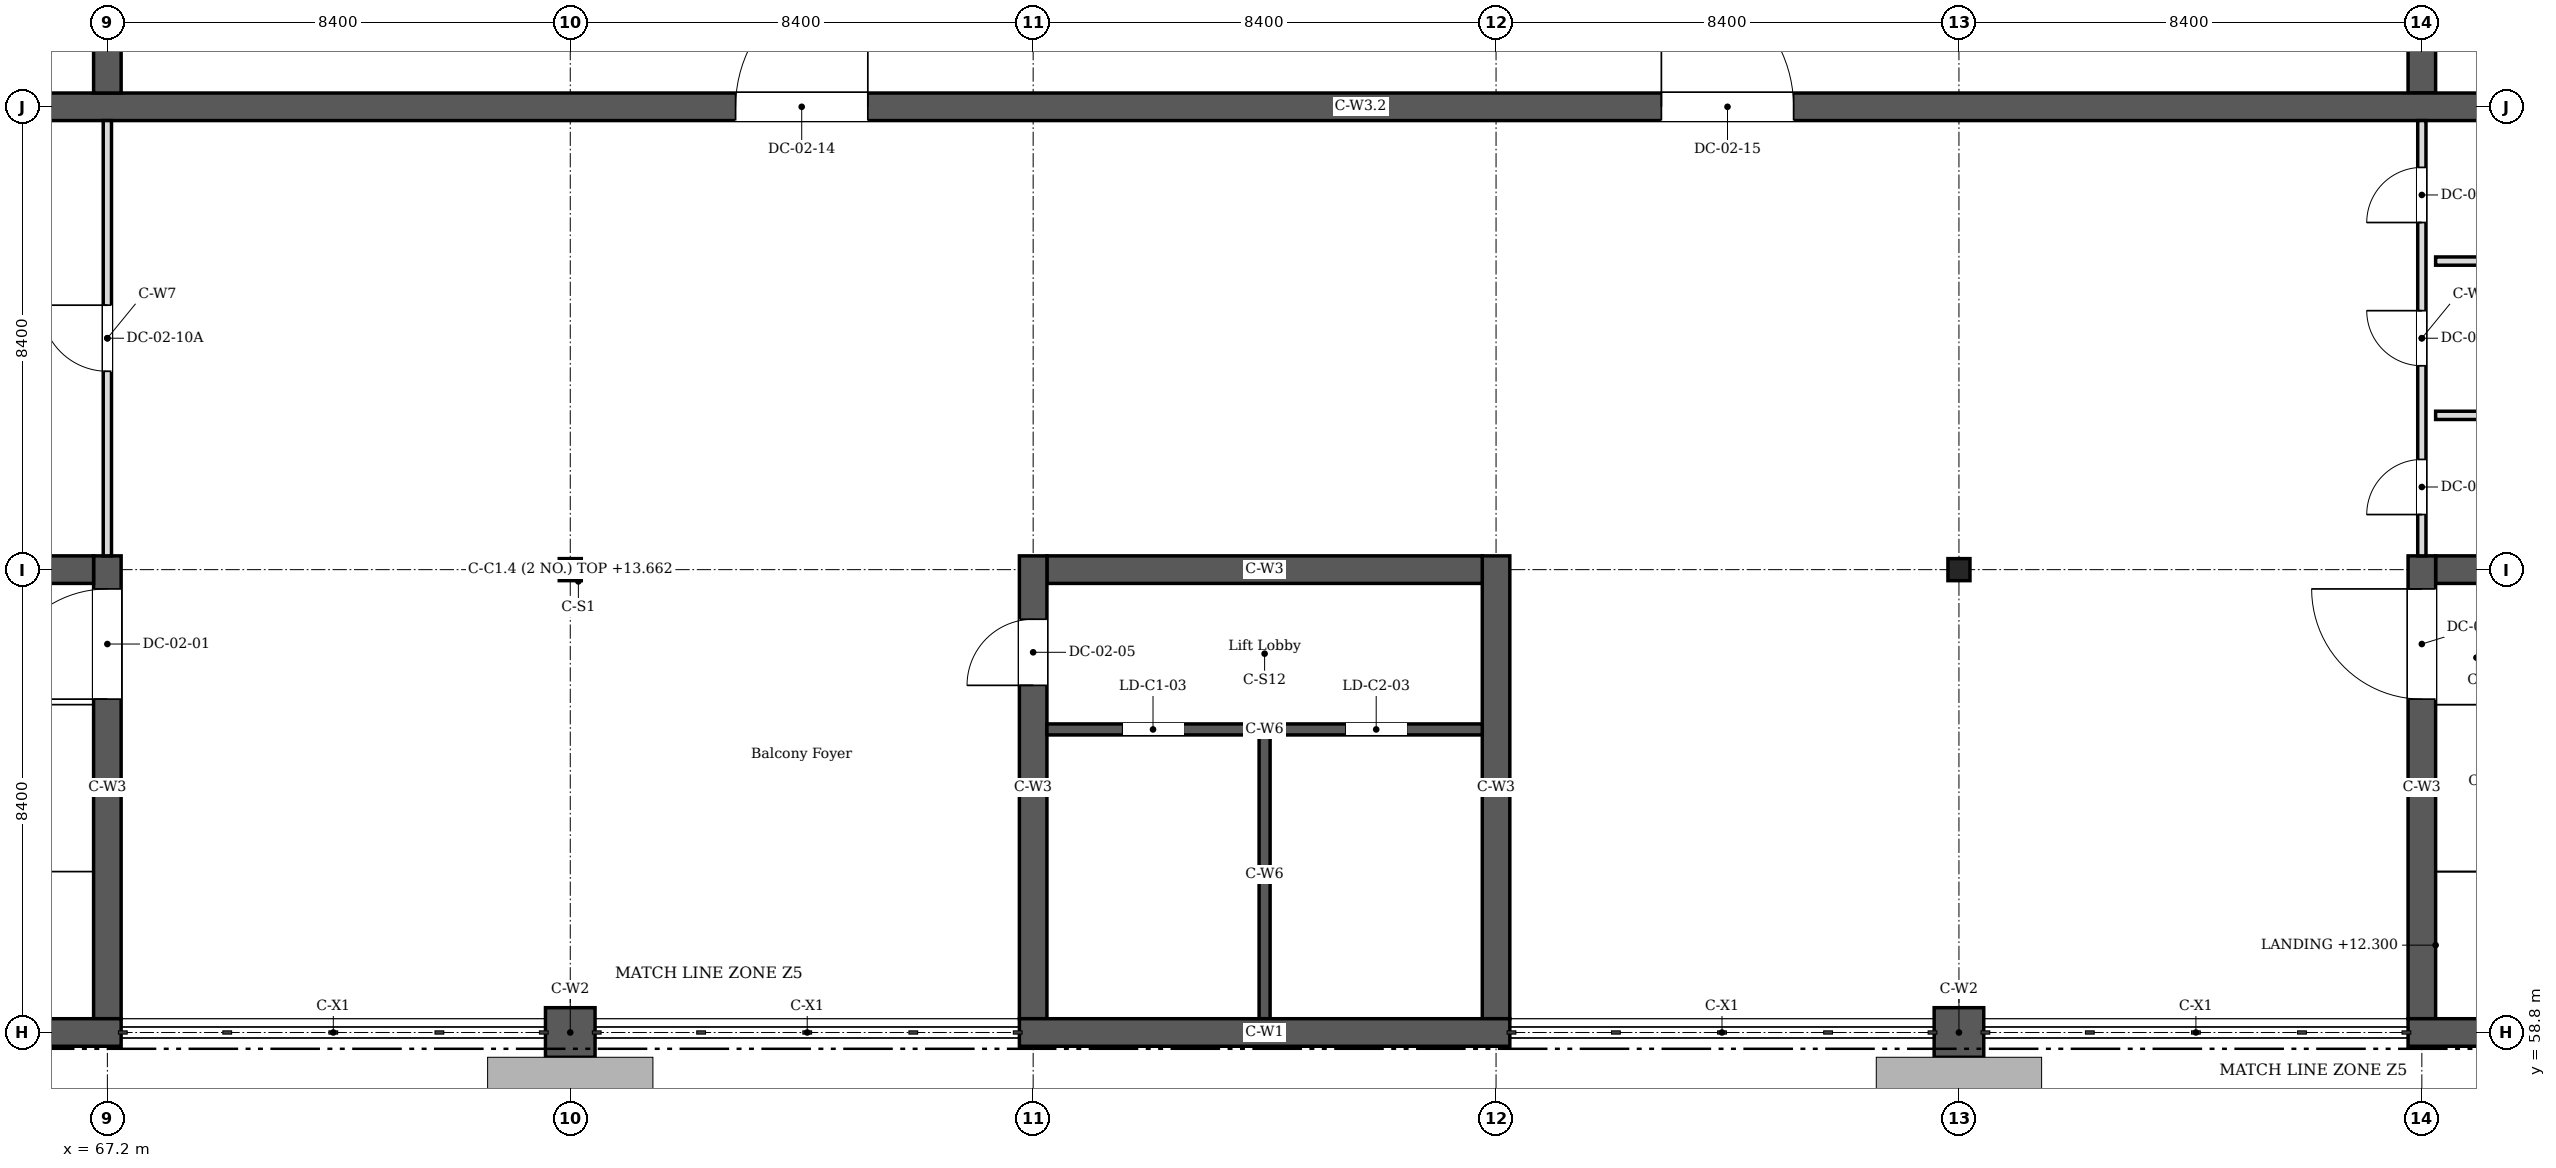
"""IFC4 building model, lengths in metres.
Left out: names, types, materials, properties, quantities, classifications, styles, units other than length and angle.
Written with IfcOpenShell. Run it as: python <this file> out.ifc"""

import sys

from ifc_helpers import new_model, si_unit, direction, frame, frame_2d, origin, origin_2d, place, context, subcontext, project, spatial, rectangle, i_section, extrude, element, fill, save


model = new_model("IFC4")
c1 = context("Model", 3, precision=1e-05, world=origin(), true_north=direction((0.0, 1.0)))
c2 = subcontext(c1, "Body", "Model", "MODEL_VIEW")
j1 = project(units=[si_unit("LENGTHUNIT", "METRE"), si_unit("PLANEANGLEUNIT", "RADIAN")], contexts=[c1])
p1 = place(None, origin())
s1 = spatial("IfcSite", under=j1, at=p1, CompositionType="ELEMENT")
p2 = place(p1, origin())
s2 = spatial("IfcBuilding", under=s1, at=p2, CompositionType="ELEMENT")
p3 = place(p2, frame((0.0, 0.0, 10.2)))
s3 = spatial("IfcBuildingStorey", under=s2, at=p3, CompositionType="ELEMENT", Elevation=10.2)
p4 = place(p3, frame((67.45, 58.8, 0.0), z_axis=(0.0, 0.0, 1.0), x_axis=(-1.0, 0.0, 0.0)))
e1 = element("IfcWall", 1, at=p4, inside=s3, PredefinedType="SOLIDWALL", context=c2, shape_type="SweptSolid", body=[
    extrude(rectangle(XDim=8.9, YDim=0.5, at=frame_2d((4.45, 0.0))), origin(), (0.0, 0.0, 1.0), 4.2),
])
p5 = place(p4, frame((4.0, 0.0, 0.9)))
e2 = element("IfcOpeningElement", 2, at=p5, cuts=e1, PredefinedType="OPENING", context=c2, shape_type="SweptSolid", body=[
    extrude(rectangle(XDim=0.9, YDim=2.4, at=frame_2d((0.45, 1.2))), frame((0.0, 0.26, 0.0), z_axis=(0.0, -1.0, 0.0), x_axis=(1.0, 0.0, 0.0)), (0.0, 0.0, 1.0), 0.52),
])
p6 = place(p3, frame((92.65, 58.8, 0.0), z_axis=(0.0, 0.0, 1.0), x_axis=(-1.0, 0.0, 0.0)))
e3 = element("IfcWall", 3, at=p6, inside=s3, PredefinedType="SOLIDWALL", context=c2, shape_type="SweptSolid", body=[
    extrude(rectangle(XDim=8.9, YDim=0.5, at=frame_2d((4.45, 0.0))), origin(), (0.0, 0.0, 1.0), 4.2),
])
p7 = place(p3, frame((117.85, 58.8, 0.0), z_axis=(0.0, 0.0, 1.0), x_axis=(-1.0, 0.0, 0.0)))
e4 = element("IfcWall", 4, at=p7, inside=s3, PredefinedType="SOLIDWALL", context=c2, shape_type="SweptSolid", body=[
    extrude(rectangle(XDim=8.9, YDim=0.5, at=frame_2d((4.45, 0.0))), origin(), (0.0, 0.0, 1.0), 4.2),
])
p8 = place(p7, frame((4.0, 0.0, 0.9)))
e5 = element("IfcOpeningElement", 5, at=p8, cuts=e4, PredefinedType="OPENING", context=c2, shape_type="SweptSolid", body=[
    extrude(rectangle(XDim=0.9, YDim=2.4, at=frame_2d((0.45, 1.2))), frame((0.0, 0.26, 0.0), z_axis=(0.0, -1.0, 0.0), x_axis=(1.0, 0.0, 0.0)), (0.0, 0.0, 1.0), 0.52),
])
p9 = place(p3, frame((75.15, 58.8, 0.0), z_axis=(0.0, 0.0, 1.0), x_axis=(1.0, 0.0, 0.0)))
e6 = element("IfcWall", 6, at=p9, inside=s3, PredefinedType="SOLIDWALL", context=c2, shape_type="SweptSolid", body=[
    extrude(rectangle(XDim=0.9, YDim=0.9, at=frame_2d((0.45, 0.0))), origin(), (0.0, 0.0, 1.0), 4.2),
])
p10 = place(p3, frame((100.35, 58.8, 0.0), z_axis=(0.0, 0.0, 1.0), x_axis=(1.0, 0.0, 0.0)))
e7 = element("IfcWall", 7, at=p10, inside=s3, PredefinedType="SOLIDWALL", context=c2, shape_type="SweptSolid", body=[
    extrude(rectangle(XDim=0.9, YDim=0.9, at=frame_2d((0.45, 0.0))), origin(), (0.0, 0.0, 1.0), 4.2),
])
p11 = place(p3, frame((59.25, 75.6, 0.0), z_axis=(0.0, 0.0, 1.0), x_axis=(1.0, 0.0, 0.0)))
e8 = element("IfcWall", 8, at=p11, inside=s3, PredefinedType="SOLIDWALL", context=c2, shape_type="SweptSolid", body=[
    extrude(rectangle(XDim=57.9, YDim=0.5, at=frame_2d((28.95, 0.0))), origin(), (0.0, 0.0, 1.0), 4.2),
])
p12 = place(p11, frame((19.35, 0.0, 0.0)))
e9 = element("IfcOpeningElement", 9, at=p12, cuts=e8, PredefinedType="OPENING", context=c2, shape_type="SweptSolid", body=[
    extrude(rectangle(XDim=2.4, YDim=2.1, at=frame_2d((1.2, 1.05))), frame((0.0, 0.26, 0.0), z_axis=(0.0, -1.0, 0.0), x_axis=(1.0, 0.0, 0.0)), (0.0, 0.0, 1.0), 0.52),
])
p13 = place(p11, frame((36.15, 0.0, 0.0)))
e10 = element("IfcOpeningElement", 10, at=p13, cuts=e8, PredefinedType="OPENING", context=c2, shape_type="SweptSolid", body=[
    extrude(rectangle(XDim=2.4, YDim=2.1, at=frame_2d((1.2, 1.05))), frame((0.0, 0.26, 0.0), z_axis=(0.0, -1.0, 0.0), x_axis=(1.0, 0.0, 0.0)), (0.0, 0.0, 1.0), 0.52),
])
p14 = place(p3, frame((67.2, 75.85, 0.0), z_axis=(0.0, 0.0, 1.0), x_axis=(0.0, 1.0, 0.0)))
e11 = element("IfcWall", 11, at=p14, inside=s3, PredefinedType="SOLIDWALL", context=c2, shape_type="SweptSolid", body=[
    extrude(rectangle(XDim=41.5, YDim=0.5, at=frame_2d((20.75, 0.0))), origin(), (0.0, 0.0, 1.0), 4.2),
])
p15 = place(p14, frame((33.7, 0.0, 0.0)))
e12 = element("IfcOpeningElement", 12, at=p15, cuts=e11, PredefinedType="OPENING", context=c2, shape_type="SweptSolid", body=[
    extrude(rectangle(XDim=2.0, YDim=2.1, at=frame_2d((1.0, 1.05))), frame((0.0, 0.26, 0.0), z_axis=(0.0, -1.0, 0.0), x_axis=(1.0, 0.0, 0.0)), (0.0, 0.0, 1.0), 0.52),
])
p16 = place(p3, frame((109.2, 117.35, 0.0), z_axis=(0.0, 0.0, 1.0), x_axis=(0.0, -1.0, 0.0)))
e13 = element("IfcWall", 13, at=p16, inside=s3, PredefinedType="SOLIDWALL", context=c2, shape_type="SweptSolid", body=[
    extrude(rectangle(XDim=41.5, YDim=0.5, at=frame_2d((20.75, 0.0))), origin(), (0.0, 0.0, 1.0), 4.2),
])
p17 = place(p16, frame((5.8, 0.0, 0.0)))
e14 = element("IfcOpeningElement", 14, at=p17, cuts=e13, PredefinedType="OPENING", context=c2, shape_type="SweptSolid", body=[
    extrude(rectangle(XDim=2.0, YDim=2.1, at=frame_2d((1.0, 1.05))), frame((0.0, 0.26, 0.0), z_axis=(0.0, -1.0, 0.0), x_axis=(1.0, 0.0, 0.0)), (0.0, 0.0, 1.0), 0.52),
])
for number, where, z_axis, x_axis in (
    (15, (75.6, 67.2, 0.0), (0.0, 0.0, 1.0), (1.0, 0.0, 0.0)),
    (16, (100.8, 67.2, 0.0), (0.0, 0.0, 1.0), (1.0, 0.0, 0.0)),
):
    element("IfcColumn", number, at=place(p3, frame(where, z_axis=z_axis, x_axis=x_axis)), inside=s3, PredefinedType="COLUMN", context=c2, shape_type="SweptSolid", body=[
        extrude(i_section(OverallWidth=0.4, OverallDepth=0.4, WebThickness=0.013, FlangeThickness=0.021, FilletRadius=0.022, at=origin_2d()), origin(), (0.0, 0.0, 1.0), 3.462),
    ])
p18 = place(p3, frame((67.2, 59.05, 0.0), z_axis=(0.0, 0.0, 1.0), x_axis=(0.0, 1.0, 0.0)))
e17 = element("IfcWall", 17, at=p18, inside=s3, PredefinedType="SOLIDWALL", context=c2, shape_type="SweptSolid", body=[
    extrude(rectangle(XDim=8.4, YDim=0.5, at=frame_2d((4.2, 0.0))), origin(), (0.0, 0.0, 1.0), 4.2),
])
p19 = place(p18, frame((5.8, 0.0, 0.0)))
e18 = element("IfcOpeningElement", 18, at=p19, cuts=e17, PredefinedType="OPENING", context=c2, shape_type="SweptSolid", body=[
    extrude(rectangle(XDim=2.0, YDim=2.1, at=frame_2d((1.0, 1.05))), frame((0.0, 0.26, 0.0), z_axis=(0.0, -1.0, 0.0), x_axis=(1.0, 0.0, 0.0)), (0.0, 0.0, 1.0), 0.52),
])
p20 = place(p3, frame((59.05, 67.2, 0.0), z_axis=(0.0, 0.0, 1.0), x_axis=(1.0, 0.0, 0.0)))
e19 = element("IfcWall", 19, at=p20, inside=s3, PredefinedType="SOLIDWALL", context=c2, shape_type="SweptSolid", body=[
    extrude(rectangle(XDim=7.9, YDim=0.5, at=frame_2d((3.95, 0.0))), origin(), (0.0, 0.0, 1.0), 4.2),
])
p21 = place(p3, frame((109.2, 59.05, 0.0), z_axis=(0.0, 0.0, 1.0), x_axis=(0.0, 1.0, 0.0)))
e20 = element("IfcWall", 20, at=p21, inside=s3, PredefinedType="SOLIDWALL", context=c2, shape_type="SweptSolid", body=[
    extrude(rectangle(XDim=8.4, YDim=0.5, at=frame_2d((4.2, 0.0))), origin(), (0.0, 0.0, 1.0), 4.2),
])
p22 = place(p21, frame((5.8, 0.0, 0.0)))
e21 = element("IfcOpeningElement", 21, at=p22, cuts=e20, PredefinedType="OPENING", context=c2, shape_type="SweptSolid", body=[
    extrude(rectangle(XDim=2.0, YDim=2.1, at=frame_2d((1.0, 1.05))), frame((0.0, 0.26, 0.0), z_axis=(0.0, -1.0, 0.0), x_axis=(1.0, 0.0, 0.0)), (0.0, 0.0, 1.0), 0.52),
])
p23 = place(p3, frame((109.45, 67.2, 0.0), z_axis=(0.0, 0.0, 1.0), x_axis=(1.0, 0.0, 0.0)))
e22 = element("IfcWall", 22, at=p23, inside=s3, PredefinedType="SOLIDWALL", context=c2, shape_type="SweptSolid", body=[
    extrude(rectangle(XDim=7.9, YDim=0.5, at=frame_2d((3.95, 0.0))), origin(), (0.0, 0.0, 1.0), 4.2),
])
p24 = place(p3, frame((92.4, 59.05, 0.0), z_axis=(0.0, 0.0, 1.0), x_axis=(0.0, 1.0, 0.0)))
e23 = element("IfcWall", 23, at=p24, inside=s3, PredefinedType="SOLIDWALL", context=c2, shape_type="SweptSolid", body=[
    extrude(rectangle(XDim=8.4, YDim=0.5, at=frame_2d((4.2, 0.0))), origin(), (0.0, 0.0, 1.0), 4.2),
])
p25 = place(p3, frame((84.0, 59.05, 0.0), z_axis=(0.0, 0.0, 1.0), x_axis=(0.0, 1.0, 0.0)))
e24 = element("IfcWall", 24, at=p25, inside=s3, PredefinedType="SOLIDWALL", context=c2, shape_type="SweptSolid", body=[
    extrude(rectangle(XDim=8.4, YDim=0.5, at=frame_2d((4.2, 0.0))), origin(), (0.0, 0.0, 1.0), 4.2),
])
p26 = place(p25, frame((6.05, 0.0, 0.0)))
e25 = element("IfcOpeningElement", 25, at=p26, cuts=e24, PredefinedType="OPENING", context=c2, shape_type="SweptSolid", body=[
    extrude(rectangle(XDim=1.2, YDim=2.1, at=frame_2d((0.6, 1.05))), frame((0.0, 0.26, 0.0), z_axis=(0.0, -1.0, 0.0), x_axis=(1.0, 0.0, 0.0)), (0.0, 0.0, 1.0), 0.52),
])
p27 = place(p3, frame((84.25, 67.2, 0.0), z_axis=(0.0, 0.0, 1.0), x_axis=(1.0, 0.0, 0.0)))
e26 = element("IfcWall", 26, at=p27, inside=s3, PredefinedType="SOLIDWALL", context=c2, shape_type="SweptSolid", body=[
    extrude(rectangle(XDim=7.9, YDim=0.5, at=frame_2d((3.95, 0.0))), origin(), (0.0, 0.0, 1.0), 4.2),
])
p28 = place(p3, frame((88.2, 59.05, 0.0), z_axis=(0.0, 0.0, 1.0), x_axis=(0.0, 1.0, 0.0)))
e27 = element("IfcWall", 27, at=p28, inside=s3, PredefinedType="PARTITIONING", context=c2, shape_type="SweptSolid", body=[
    extrude(rectangle(XDim=5.25, YDim=0.2, at=frame_2d((2.625, 0.0))), origin(), (0.0, 0.0, 1.0), 4.2),
])
p29 = place(p3, frame((84.25, 64.3, 0.0), z_axis=(0.0, 0.0, 1.0), x_axis=(1.0, 0.0, 0.0)))
e28 = element("IfcWall", 28, at=p29, inside=s3, PredefinedType="PARTITIONING", context=c2, shape_type="SweptSolid", body=[
    extrude(rectangle(XDim=7.9, YDim=0.2, at=frame_2d((3.95, 0.0))), origin(), (0.0, 0.0, 1.0), 4.2),
])
p30 = place(p29, frame((1.375, 0.0, 0.0)))
e29 = element("IfcOpeningElement", 29, at=p30, cuts=e28, PredefinedType="OPENING", context=c2, shape_type="SweptSolid", body=[
    extrude(rectangle(XDim=1.1, YDim=2.1, at=frame_2d((0.55, 1.05))), frame((0.0, 0.11, 0.0), z_axis=(0.0, -1.0, 0.0), x_axis=(1.0, 0.0, 0.0)), (0.0, 0.0, 1.0), 0.22),
])
p31 = place(p29, frame((5.425, 0.0, 0.0)))
e30 = element("IfcOpeningElement", 30, at=p31, cuts=e28, PredefinedType="OPENING", context=c2, shape_type="SweptSolid", body=[
    extrude(rectangle(XDim=1.1, YDim=2.1, at=frame_2d((0.55, 1.05))), frame((0.0, 0.11, 0.0), z_axis=(0.0, -1.0, 0.0), x_axis=(1.0, 0.0, 0.0)), (0.0, 0.0, 1.0), 0.22),
])
p32 = place(p3, frame((67.2, 67.45, 0.0), z_axis=(0.0, 0.0, 1.0), x_axis=(0.0, 1.0, 0.0)))
e31 = element("IfcWall", 31, at=p32, inside=s3, PredefinedType="PARTITIONING", context=c2, shape_type="SweptSolid", body=[
    extrude(rectangle(XDim=7.9, YDim=0.15, at=frame_2d((3.95, 0.0))), origin(), (0.0, 0.0, 1.0), 3.55),
])
p33 = place(p32, frame((3.35, 0.0, 0.0)))
e32 = element("IfcOpeningElement", 32, at=p33, cuts=e31, PredefinedType="OPENING", context=c2, shape_type="SweptSolid", body=[
    extrude(rectangle(XDim=1.2, YDim=2.1, at=frame_2d((0.6, 1.05))), frame((0.0, 0.085, 0.0), z_axis=(0.0, -1.0, 0.0), x_axis=(1.0, 0.0, 0.0)), (0.0, 0.0, 1.0), 0.17),
])
p34 = place(p3, frame((109.2, 67.45, 0.0), z_axis=(0.0, 0.0, 1.0), x_axis=(0.0, 1.0, 0.0)))
e33 = element("IfcWall", 33, at=p34, inside=s3, PredefinedType="PARTITIONING", context=c2, shape_type="SweptSolid", body=[
    extrude(rectangle(XDim=7.9, YDim=0.15, at=frame_2d((3.95, 0.0))), origin(), (0.0, 0.0, 1.0), 3.55),
])
p35 = place(p34, frame((0.75, 0.0, 0.0)))
e34 = element("IfcOpeningElement", 34, at=p35, cuts=e33, PredefinedType="OPENING", context=c2, shape_type="SweptSolid", body=[
    extrude(rectangle(XDim=1.0, YDim=2.1, at=frame_2d((0.5, 1.05))), frame((0.0, 0.085, 0.0), z_axis=(0.0, -1.0, 0.0), x_axis=(1.0, 0.0, 0.0)), (0.0, 0.0, 1.0), 0.17),
])
p36 = place(p34, frame((3.45, 0.0, 0.0)))
e35 = element("IfcOpeningElement", 35, at=p36, cuts=e33, PredefinedType="OPENING", context=c2, shape_type="SweptSolid", body=[
    extrude(rectangle(XDim=1.0, YDim=2.1, at=frame_2d((0.5, 1.05))), frame((0.0, 0.085, 0.0), z_axis=(0.0, -1.0, 0.0), x_axis=(1.0, 0.0, 0.0)), (0.0, 0.0, 1.0), 0.17),
])
p37 = place(p34, frame((6.05, 0.0, 0.0)))
e36 = element("IfcOpeningElement", 36, at=p37, cuts=e33, PredefinedType="OPENING", context=c2, shape_type="SweptSolid", body=[
    extrude(rectangle(XDim=1.0, YDim=2.1, at=frame_2d((0.5, 1.05))), frame((0.0, 0.085, 0.0), z_axis=(0.0, -1.0, 0.0), x_axis=(1.0, 0.0, 0.0)), (0.0, 0.0, 1.0), 0.17),
])
for number, where, z_axis, x_axis in (
    (37, (109.45, 70.0, 0.0), (0.0, 0.0, 1.0), (1.0, 0.0, 0.0)),
    (38, (109.45, 72.8, 0.0), (0.0, 0.0, 1.0), (1.0, 0.0, 0.0)),
):
    element("IfcWall", number, at=place(p3, frame(where, z_axis=z_axis, x_axis=x_axis)), inside=s3, PredefinedType="PARTITIONING", context=c2, shape_type="SweptSolid", body=[
        extrude(rectangle(XDim=7.9, YDim=0.15, at=frame_2d((3.95, 0.0))), origin(), (0.0, 0.0, 1.0), 3.55),
    ])
p38 = place(p30, origin())
e39 = element("IfcDoor", 39, at=p38, inside=s3, OperationType="SLIDING_TO_LEFT", PredefinedType="DOOR", context=c2, shape_type="SweptSolid", body=[
    extrude(rectangle(XDim=1.1, YDim=2.1, at=frame_2d((0.55, 1.05))), frame((0.0, 0.025, 0.0), z_axis=(0.0, -1.0, 0.0), x_axis=(1.0, 0.0, 0.0)), (0.0, 0.0, 1.0), 0.05),
])
fill(e29, e39)
p39 = place(p31, origin())
e40 = element("IfcDoor", 40, at=p39, inside=s3, OperationType="SLIDING_TO_LEFT", PredefinedType="DOOR", context=c2, shape_type="SweptSolid", body=[
    extrude(rectangle(XDim=1.1, YDim=2.1, at=frame_2d((0.55, 1.05))), frame((0.0, 0.025, 0.0), z_axis=(0.0, -1.0, 0.0), x_axis=(1.0, 0.0, 0.0)), (0.0, 0.0, 1.0), 0.05),
])
fill(e30, e40)
p40 = place(p19, origin())
e41 = element("IfcDoor", 41, at=p40, inside=s3, OperationType="DOUBLE_DOOR_DOUBLE_SWING", PredefinedType="DOOR", context=c2, shape_type="SweptSolid", body=[
    extrude(rectangle(XDim=2.0, YDim=2.1, at=frame_2d((1.0, 1.05))), frame((0.0, 0.025, 0.0), z_axis=(0.0, -1.0, 0.0), x_axis=(1.0, 0.0, 0.0)), (0.0, 0.0, 1.0), 0.05),
])
fill(e18, e41)
p41 = place(p22, origin())
e42 = element("IfcDoor", 42, at=p41, inside=s3, OperationType="DOUBLE_DOOR_DOUBLE_SWING", PredefinedType="DOOR", context=c2, shape_type="SweptSolid", body=[
    extrude(rectangle(XDim=2.0, YDim=2.1, at=frame_2d((1.0, 1.05))), frame((0.0, 0.025, 0.0), z_axis=(0.0, -1.0, 0.0), x_axis=(1.0, 0.0, 0.0)), (0.0, 0.0, 1.0), 0.05),
])
fill(e21, e42)
p42 = place(p26, origin())
e43 = element("IfcDoor", 43, at=p42, inside=s3, OperationType="SINGLE_SWING_LEFT", PredefinedType="DOOR", context=c2, shape_type="SweptSolid", body=[
    extrude(rectangle(XDim=1.2, YDim=2.1, at=frame_2d((0.6, 1.05))), frame((0.0, 0.025, 0.0), z_axis=(0.0, -1.0, 0.0), x_axis=(1.0, 0.0, 0.0)), (0.0, 0.0, 1.0), 0.05),
])
fill(e25, e43)
p43 = place(p33, origin())
e44 = element("IfcDoor", 44, at=p43, inside=s3, OperationType="SINGLE_SWING_LEFT", PredefinedType="DOOR", context=c2, shape_type="SweptSolid", body=[
    extrude(rectangle(XDim=1.2, YDim=2.1, at=frame_2d((0.6, 1.05))), frame((0.0, 0.025, 0.0), z_axis=(0.0, -1.0, 0.0), x_axis=(1.0, 0.0, 0.0)), (0.0, 0.0, 1.0), 0.05),
])
fill(e32, e44)
p44 = place(p35, origin())
e45 = element("IfcDoor", 45, at=p44, inside=s3, OperationType="SINGLE_SWING_LEFT", PredefinedType="DOOR", context=c2, shape_type="SweptSolid", body=[
    extrude(rectangle(XDim=1.0, YDim=2.1, at=frame_2d((0.5, 1.05))), frame((0.0, 0.025, 0.0), z_axis=(0.0, -1.0, 0.0), x_axis=(1.0, 0.0, 0.0)), (0.0, 0.0, 1.0), 0.05),
])
fill(e34, e45)
p45 = place(p36, origin())
e46 = element("IfcDoor", 46, at=p45, inside=s3, OperationType="SINGLE_SWING_LEFT", PredefinedType="DOOR", context=c2, shape_type="SweptSolid", body=[
    extrude(rectangle(XDim=1.0, YDim=2.1, at=frame_2d((0.5, 1.05))), frame((0.0, 0.025, 0.0), z_axis=(0.0, -1.0, 0.0), x_axis=(1.0, 0.0, 0.0)), (0.0, 0.0, 1.0), 0.05),
])
fill(e35, e46)
p46 = place(p37, origin())
e47 = element("IfcDoor", 47, at=p46, inside=s3, OperationType="SINGLE_SWING_LEFT", PredefinedType="DOOR", context=c2, shape_type="SweptSolid", body=[
    extrude(rectangle(XDim=1.0, YDim=2.1, at=frame_2d((0.5, 1.05))), frame((0.0, 0.025, 0.0), z_axis=(0.0, -1.0, 0.0), x_axis=(1.0, 0.0, 0.0)), (0.0, 0.0, 1.0), 0.05),
])
fill(e36, e47)
p47 = place(p12, origin())
e48 = element("IfcDoor", 48, at=p47, inside=s3, OperationType="DOUBLE_DOOR_DOUBLE_SWING", PredefinedType="DOOR", context=c2, shape_type="SweptSolid", body=[
    extrude(rectangle(XDim=2.4, YDim=2.1, at=frame_2d((1.2, 1.05))), frame((0.0, 0.025, 0.0), z_axis=(0.0, -1.0, 0.0), x_axis=(1.0, 0.0, 0.0)), (0.0, 0.0, 1.0), 0.05),
])
fill(e9, e48)
p48 = place(p13, origin())
e49 = element("IfcDoor", 49, at=p48, inside=s3, OperationType="DOUBLE_DOOR_DOUBLE_SWING", PredefinedType="DOOR", context=c2, shape_type="SweptSolid", body=[
    extrude(rectangle(XDim=2.4, YDim=2.1, at=frame_2d((1.2, 1.05))), frame((0.0, 0.025, 0.0), z_axis=(0.0, -1.0, 0.0), x_axis=(1.0, 0.0, 0.0)), (0.0, 0.0, 1.0), 0.05),
])
fill(e10, e49)
save(model, sys.argv[1])
